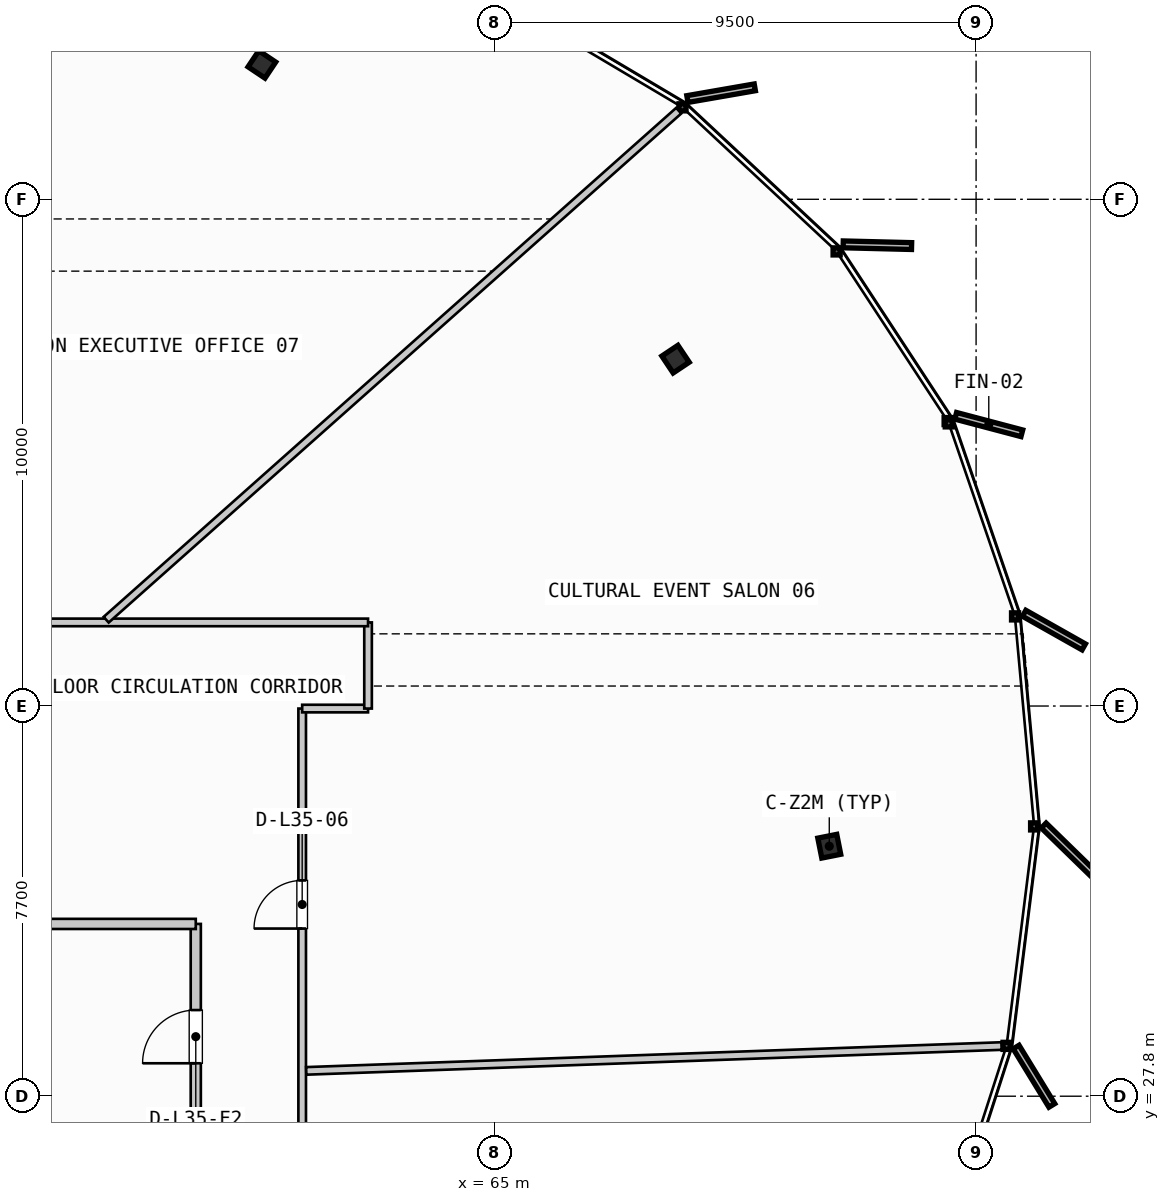
"""IFC4 building model, lengths in metres.
Left out: names, types, materials, properties, quantities, classifications, styles, units other than length and angle.
Written with IfcOpenShell. Run it as: python <this file> out.ifc"""

import sys

from ifc_helpers import new_model, si_unit, direction, frame, frame_2d, origin, origin_2d, place, context, subcontext, project, spatial, rectangle, i_section, extrude, source, transform, mapped, element, fill, save


model = new_model("IFC4")
c1 = context("Model", 3, precision=1e-05, world=origin(), true_north=direction((0.0, 1.0)))
c2 = subcontext(c1, "Body", "Model", "MODEL_VIEW")
j1 = project(units=[si_unit("LENGTHUNIT", "METRE"), si_unit("PLANEANGLEUNIT", "RADIAN")], contexts=[c1])
p1 = place(None, origin())
s1 = spatial("IfcSite", under=j1, at=p1, CompositionType="ELEMENT")
p2 = place(p1, origin())
s2 = spatial("IfcBuilding", under=s1, at=p2, CompositionType="ELEMENT")
p3 = place(p2, frame((0.0, 0.0, 139.45)))
s3 = spatial("IfcBuildingStorey", under=s2, at=p3, CompositionType="ELEMENT", Elevation=139.45)
m1 = source(origin(), c2, "Body", "SweptSolid", [
    extrude(i_section(OverallWidth=0.401, OverallDepth=0.381, WebThickness=0.032, FlangeThickness=0.051, FilletRadius=0.015, at=origin_2d()), origin(), (0.0, 0.0, 1.0), 3.3),
])
for number, where, z_axis, x_axis in (
    (1, (71.603, 32.733, 0.0), (0.0, 0.0, 1.0), (0.981, 0.195, 0.0)),
    (2, (68.569, 42.345, 0.0), (0.0, 0.0, 1.0), (0.831, 0.556, 0.0)),
    (3, (60.405, 48.161, 0.0), (0.0, 0.0, 1.0), (0.556, 0.831, 0.0)),
):
    element("IfcColumn", number, at=place(p3, frame(where, z_axis=z_axis, x_axis=x_axis)), inside=s3, PredefinedType="COLUMN", context=c2, shape_type="MappedRepresentation", body=[
        mapped(m1, transform((0.0, 0.0, 0.0), scale=1.0)),
    ])
p4 = place(p3, frame((59.1, 26.8, 0.0), z_axis=(0.0, 0.0, 1.0), x_axis=(0.0, 1.0, 0.0)))
e4 = element("IfcWall", 4, at=p4, inside=s3, PredefinedType="PARTITIONING", context=c2, shape_type="SweptSolid", body=[
    extrude(rectangle(XDim=4.4, YDim=0.2, at=frame_2d((2.2, 0.0))), origin(), (0.0, 0.0, 1.0), 2.305),
])
p5 = place(p4, frame((1.65, 0.0, 0.0)))
e5 = element("IfcOpeningElement", 5, at=p5, cuts=e4, PredefinedType="OPENING", context=c2, shape_type="SweptSolid", body=[
    extrude(rectangle(XDim=1.05, YDim=2.15, at=frame_2d((0.525, 1.075))), frame((0.0, 0.11, 0.0), z_axis=(0.0, -1.0, 0.0), x_axis=(1.0, 0.0, 0.0)), (0.0, 0.0, 1.0), 0.22),
])
p6 = place(p3, frame((55.885, 31.2, 0.0), z_axis=(0.0, 0.0, 1.0), x_axis=(1.0, 0.0, 0.0)))
e6 = element("IfcWall", 6, at=p6, inside=s3, PredefinedType="PARTITIONING", context=c2, shape_type="SweptSolid", body=[
    extrude(rectangle(XDim=3.215, YDim=0.2, at=frame_2d((1.607, 0.0))), origin(), (0.0, 0.0, 1.0), 2.305),
])
p7 = place(p3, frame((61.2, 20.15, 0.0), z_axis=(0.0, 0.0, 1.0), x_axis=(0.0, 1.0, 0.0)))
e7 = element("IfcWall", 7, at=p7, inside=s3, PredefinedType="PARTITIONING", context=c2, shape_type="SweptSolid", body=[
    extrude(rectangle(XDim=15.3, YDim=0.15, at=frame_2d((7.65, 0.0))), origin(), (0.0, 0.0, 1.0), 2.305),
])
p8 = place(p7, frame((5.187, 0.0, 0.0)))
e8 = element("IfcOpeningElement", 8, at=p8, cuts=e7, PredefinedType="OPENING", context=c2, shape_type="SweptSolid", body=[
    extrude(rectangle(XDim=0.95, YDim=2.15, at=frame_2d((0.475, 1.075))), frame((0.0, 0.085, 0.0), z_axis=(0.0, -1.0, 0.0), x_axis=(1.0, 0.0, 0.0)), (0.0, 0.0, 1.0), 0.17),
])
p9 = place(p7, frame((10.958, 0.0, 0.0)))
e9 = element("IfcOpeningElement", 9, at=p9, cuts=e7, PredefinedType="OPENING", context=c2, shape_type="SweptSolid", body=[
    extrude(rectangle(XDim=0.95, YDim=2.15, at=frame_2d((0.475, 1.075))), frame((0.0, 0.085, 0.0), z_axis=(0.0, -1.0, 0.0), x_axis=(1.0, 0.0, 0.0)), (0.0, 0.0, 1.0), 0.17),
])
p10 = place(p3, frame((61.2, 35.45, 0.0), z_axis=(0.0, 0.0, 1.0), x_axis=(1.0, 0.0, 0.0)))
e10 = element("IfcWall", 10, at=p10, inside=s3, PredefinedType="PARTITIONING", context=c2, shape_type="SweptSolid", body=[
    extrude(rectangle(XDim=1.3, YDim=0.15, at=frame_2d((0.65, 0.0))), origin(), (0.0, 0.0, 1.0), 2.305),
])
p11 = place(p3, frame((62.5, 35.45, 0.0), z_axis=(0.0, 0.0, 1.0), x_axis=(0.0, 1.0, 0.0)))
e11 = element("IfcWall", 11, at=p11, inside=s3, PredefinedType="PARTITIONING", context=c2, shape_type="SweptSolid", body=[
    extrude(rectangle(XDim=1.7, YDim=0.15, at=frame_2d((0.85, 0.0))), origin(), (0.0, 0.0, 1.0), 2.305),
])
p12 = place(p3, frame((62.5, 37.15, 0.0), z_axis=(0.0, 0.0, 1.0), x_axis=(-1.0, 0.0, 0.0)))
e12 = element("IfcWall", 12, at=p12, inside=s3, PredefinedType="PARTITIONING", context=c2, shape_type="SweptSolid", body=[
    extrude(rectangle(XDim=31.4, YDim=0.15, at=frame_2d((15.7, 0.0))), origin(), (0.0, 0.0, 1.0), 2.305),
])
p13 = place(p12, frame((8.163, 0.0, 0.0)))
e13 = element("IfcOpeningElement", 13, at=p13, cuts=e12, PredefinedType="OPENING", context=c2, shape_type="SweptSolid", body=[
    extrude(rectangle(XDim=0.95, YDim=2.15, at=frame_2d((0.475, 1.075))), frame((0.0, 0.085, 0.0), z_axis=(0.0, -1.0, 0.0), x_axis=(1.0, 0.0, 0.0)), (0.0, 0.0, 1.0), 0.17),
])
p14 = place(p12, frame((14.62, 0.0, 0.0)))
e14 = element("IfcOpeningElement", 14, at=p14, cuts=e12, PredefinedType="OPENING", context=c2, shape_type="SweptSolid", body=[
    extrude(rectangle(XDim=0.95, YDim=2.15, at=frame_2d((0.475, 1.075))), frame((0.0, 0.085, 0.0), z_axis=(0.0, -1.0, 0.0), x_axis=(1.0, 0.0, 0.0)), (0.0, 0.0, 1.0), 0.17),
])
p15 = place(p12, frame((22.04, 0.0, 0.0)))
e15 = element("IfcOpeningElement", 15, at=p15, cuts=e12, PredefinedType="OPENING", context=c2, shape_type="SweptSolid", body=[
    extrude(rectangle(XDim=0.95, YDim=2.15, at=frame_2d((0.475, 1.075))), frame((0.0, 0.085, 0.0), z_axis=(0.0, -1.0, 0.0), x_axis=(1.0, 0.0, 0.0)), (0.0, 0.0, 1.0), 0.17),
])
p16 = place(p3, frame((61.28, 28.3, 0.0), z_axis=(0.0, 0.0, 1.0), x_axis=(0.999361789329, 0.035721338578, 0.0)))
e16 = element("IfcWall", 16, at=p16, inside=s3, PredefinedType="PARTITIONING", context=c2, shape_type="SweptSolid", body=[
    extrude(rectangle(XDim=13.731, YDim=0.15, at=frame_2d((6.865, 0.0))), origin(), (0.0, 0.0, 1.0), 2.305),
])
p17 = place(p3, frame((57.332, 37.203, 0.0), z_axis=(0.0, 0.0, 1.0), x_axis=(0.747365661558, 0.664412949847, 0.0)))
e17 = element("IfcWall", 17, at=p17, inside=s3, PredefinedType="PARTITIONING", context=c2, shape_type="SweptSolid", body=[
    extrude(rectangle(XDim=15.119, YDim=0.15, at=frame_2d((7.56, 0.0))), origin(), (0.0, 0.0, 1.0), 2.305),
])
m2 = source(origin(), c2, "Body", "SweptSolid", [
    extrude(rectangle(XDim=1.05, YDim=2.15, at=frame_2d((0.525, 1.075))), frame((0.0, 0.025, 0.0), z_axis=(0.0, -1.0, 0.0), x_axis=(1.0, 0.0, 0.0)), (0.0, 0.0, 1.0), 0.05),
])
p18 = place(p5, origin())
e18 = element("IfcDoor", 18, at=p18, inside=s3, OperationType="SINGLE_SWING_LEFT", PredefinedType="DOOR", context=c2, shape_type="MappedRepresentation", body=[
    mapped(m2, transform((0.0, 0.0, 0.0), scale=1.0)),
])
fill(e5, e18)
m3 = source(origin(), c2, "Body", "SweptSolid", [
    extrude(rectangle(XDim=0.95, YDim=2.15, at=frame_2d((0.475, 1.075))), frame((0.0, 0.025, 0.0), z_axis=(0.0, -1.0, 0.0), x_axis=(1.0, 0.0, 0.0)), (0.0, 0.0, 1.0), 0.05),
])
p19 = place(p9, origin())
e19 = element("IfcDoor", 19, at=p19, inside=s3, OperationType="SINGLE_SWING_LEFT", PredefinedType="DOOR", context=c2, shape_type="MappedRepresentation", body=[
    mapped(m3, transform((0.0, 0.0, 0.0), scale=1.0)),
])
fill(e9, e19)
save(model, sys.argv[1])
